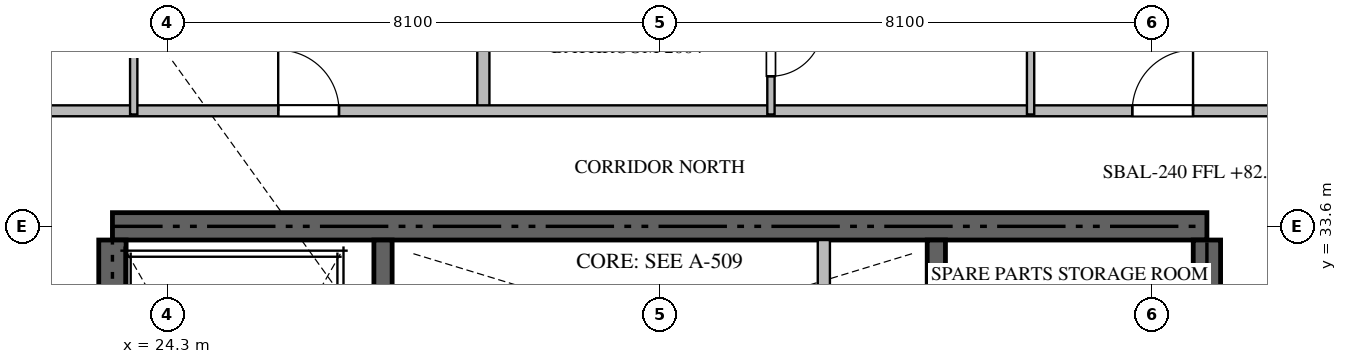
"""IFC4 building model, lengths in metres.
Left out: names, types, materials, properties, quantities, classifications, styles, units other than length and angle.
Written with IfcOpenShell. Run it as: python <this file> out.ifc"""

import sys

from ifc_helpers import new_model, si_unit, direction, frame, frame_2d, origin, place, context, subcontext, project, spatial, rectangle, extrude, source, transform, mapped, element, fill, save


model = new_model("IFC4")
c1 = context("Model", 3, precision=1e-05, world=origin(), true_north=direction((0.0, 1.0)))
c2 = subcontext(c1, "Body", "Model", "MODEL_VIEW")
j1 = project(units=[si_unit("LENGTHUNIT", "METRE"), si_unit("PLANEANGLEUNIT", "RADIAN")], contexts=[c1])
p1 = place(None, origin())
s1 = spatial("IfcSite", under=j1, at=p1, CompositionType="ELEMENT")
p2 = place(p1, origin())
s2 = spatial("IfcBuilding", under=s1, at=p2, CompositionType="ELEMENT")
p3 = place(p2, frame((0.0, 0.0, 82.95)))
s3 = spatial("IfcBuildingStorey", under=s2, at=p3, CompositionType="ELEMENT", Elevation=82.95)
p4 = place(p3, frame((41.4, 33.6, -0.26), z_axis=(0.0, 0.0, 1.0), x_axis=(-1.0, 0.0, 0.0)))
e1 = element("IfcWall", 1, at=p4, inside=s3, PredefinedType="SHEAR", context=c2, shape_type="SweptSolid", body=[
    extrude(rectangle(XDim=18.0, YDim=0.45, at=frame_2d((9.0, 0.0))), origin(), (0.0, 0.0, 1.0), 3.748),
])
p5 = place(p3, frame((23.4, 24.25, -0.26), z_axis=(0.0, 0.0, 1.0), x_axis=(0.0, 1.0, 0.0)))
e2 = element("IfcWall", 2, at=p5, inside=s3, PredefinedType="SHEAR", context=c2, shape_type="SweptSolid", body=[
    extrude(rectangle(XDim=9.125, YDim=0.45, at=frame_2d((4.562, 0.0))), origin(), (0.0, 0.0, 1.0), 3.748),
])
p6 = place(p3, frame((41.4, 27.75, -0.26), z_axis=(0.0, 0.0, 1.0), x_axis=(0.0, 1.0, 0.0)))
e3 = element("IfcWall", 3, at=p6, inside=s3, PredefinedType="SHEAR", context=c2, shape_type="SweptSolid", body=[
    extrude(rectangle(XDim=5.625, YDim=0.45, at=frame_2d((2.812, 0.0))), origin(), (0.0, 0.0, 1.0), 3.748),
])
p7 = place(p3, frame((27.85, 23.55, -0.26), z_axis=(0.0, 0.0, 1.0), x_axis=(0.0, 1.0, 0.0)))
e4 = element("IfcWall", 4, at=p7, inside=s3, PredefinedType="SHEAR", context=c2, shape_type="SweptSolid", body=[
    extrude(rectangle(XDim=9.825, YDim=0.3, at=frame_2d((4.913, 0.0))), origin(), (0.0, 0.0, 1.0), 3.748),
])
p8 = place(p3, frame((36.95, 27.05, -0.26), z_axis=(0.0, 0.0, 1.0), x_axis=(0.0, 1.0, 0.0)))
e5 = element("IfcWall", 5, at=p8, inside=s3, PredefinedType="SHEAR", context=c2, shape_type="SweptSolid", body=[
    extrude(rectangle(XDim=6.325, YDim=0.3, at=frame_2d((3.163, 0.0))), origin(), (0.0, 0.0, 1.0), 3.748),
])
p9 = place(p3, frame((35.1, 30.75, 0.0), z_axis=(0.0, 0.0, 1.0), x_axis=(0.0, 1.0, 0.0)))
e6 = element("IfcWall", 6, at=p9, inside=s3, PredefinedType="STANDARD", context=c2, shape_type="SweptSolid", body=[
    extrude(rectangle(XDim=2.625, YDim=0.2, at=frame_2d((1.312, 0.0))), origin(), (0.0, 0.0, 1.0), 3.49),
])
p10 = place(p3, frame((29.5, 35.5, 0.0), z_axis=(0.0, 0.0, 1.0), x_axis=(0.0, 1.0, 0.0)))
e7 = element("IfcWall", 7, at=p10, inside=s3, PredefinedType="PARTITIONING", context=c2, shape_type="SweptSolid", body=[
    extrude(rectangle(XDim=14.618, YDim=0.2, at=frame_2d((7.309, 0.0))), origin(), (0.0, 0.0, 1.0), 3.49),
])
p11 = place(p3, frame((21.402, 35.5, 0.0), z_axis=(0.0, 0.0, 1.0), x_axis=(1.0, 0.0, 0.0)))
e8 = element("IfcWall", 8, at=p11, inside=s3, PredefinedType="PARTITIONING", context=c2, shape_type="SweptSolid", body=[
    extrude(rectangle(XDim=21.996, YDim=0.18, at=frame_2d((10.998, 0.0))), origin(), (0.0, 0.0, 1.0), 3.49),
])
p12 = place(p11, frame((4.724, 0.0, 0.0)))
e9 = element("IfcOpeningElement", 9, at=p12, cuts=e8, PredefinedType="OPENING", context=c2, shape_type="SweptSolid", body=[
    extrude(rectangle(XDim=1.0, YDim=2.15, at=frame_2d((0.5, 1.075))), frame((0.0, 0.1, 0.0), z_axis=(0.0, -1.0, 0.0), x_axis=(1.0, 0.0, 0.0)), (0.0, 0.0, 1.0), 0.2),
])
p13 = place(p11, frame((18.77, 0.0, 0.0)))
e10 = element("IfcOpeningElement", 10, at=p13, cuts=e8, PredefinedType="OPENING", context=c2, shape_type="SweptSolid", body=[
    extrude(rectangle(XDim=1.0, YDim=2.15, at=frame_2d((0.5, 1.075))), frame((0.0, 0.1, 0.0), z_axis=(0.0, -1.0, 0.0), x_axis=(1.0, 0.0, 0.0)), (0.0, 0.0, 1.0), 0.2),
])
for number, where, z_axis, x_axis in (
    (11, (23.75, 38.25, 0.0), (0.0, 0.0, 1.0), (0.0, -1.0, 0.0)),
    (12, (38.5, 38.25, 0.0), (0.0, 0.0, 1.0), (0.0, -1.0, 0.0)),
):
    element("IfcWall", number, at=place(p3, frame(where, z_axis=z_axis, x_axis=x_axis)), inside=s3, PredefinedType="PARTITIONING", context=c2, shape_type="SweptSolid", body=[
        extrude(rectangle(XDim=2.81, YDim=0.12, at=frame_2d((1.405, 0.0))), origin(), (0.0, 0.0, 1.0), 3.49),
    ])
p14 = place(p3, frame((34.23, 37.548, 0.0), z_axis=(0.0, 0.0, 1.0), x_axis=(0.0, -1.0, 0.0)))
e13 = element("IfcWall", 13, at=p14, inside=s3, PredefinedType="PARTITIONING", context=c2, shape_type="SweptSolid", body=[
    extrude(rectangle(XDim=2.108, YDim=0.12, at=frame_2d((1.054, 0.0))), origin(), (0.0, 0.0, 1.0), 3.49),
])
p15 = place(p14, frame((0.629, 0.0, 0.0)))
e14 = element("IfcOpeningElement", 14, at=p15, cuts=e13, PredefinedType="OPENING", context=c2, shape_type="SweptSolid", body=[
    extrude(rectangle(XDim=0.85, YDim=2.1, at=frame_2d((0.425, 1.05))), frame((0.0, 0.07, 0.0), z_axis=(0.0, -1.0, 0.0), x_axis=(1.0, 0.0, 0.0)), (0.0, 0.0, 1.0), 0.14),
])
m1 = source(origin(), c2, "Body", "SweptSolid", [
    extrude(rectangle(XDim=1.0, YDim=2.15, at=frame_2d((0.5, 1.075))), frame((0.0, 0.025, 0.0), z_axis=(0.0, -1.0, 0.0), x_axis=(1.0, 0.0, 0.0)), (0.0, 0.0, 1.0), 0.05),
])
p16 = place(p12, origin())
e15 = element("IfcDoor", 15, at=p16, inside=s3, OperationType="SINGLE_SWING_LEFT", PredefinedType="DOOR", context=c2, shape_type="MappedRepresentation", body=[
    mapped(m1, transform((0.0, 0.0, 0.0), scale=1.0)),
])
fill(e9, e15)
p17 = place(p13, origin())
e16 = element("IfcDoor", 16, at=p17, inside=s3, OperationType="SINGLE_SWING_RIGHT", PredefinedType="DOOR", context=c2, shape_type="MappedRepresentation", body=[
    mapped(m1, transform((0.0, 0.0, 0.0), scale=1.0)),
])
fill(e10, e16)
m2 = source(origin(), c2, "Body", "SweptSolid", [
    extrude(rectangle(XDim=0.85, YDim=2.1, at=frame_2d((0.425, 1.05))), frame((0.0, 0.025, 0.0), z_axis=(0.0, -1.0, 0.0), x_axis=(1.0, 0.0, 0.0)), (0.0, 0.0, 1.0), 0.05),
])
p18 = place(p15, origin())
e17 = element("IfcDoor", 17, at=p18, inside=s3, OperationType="SINGLE_SWING_LEFT", PredefinedType="DOOR", context=c2, shape_type="MappedRepresentation", body=[
    mapped(m2, transform((0.0, 0.0, 0.0), scale=1.0)),
])
fill(e14, e17)
save(model, sys.argv[1])
